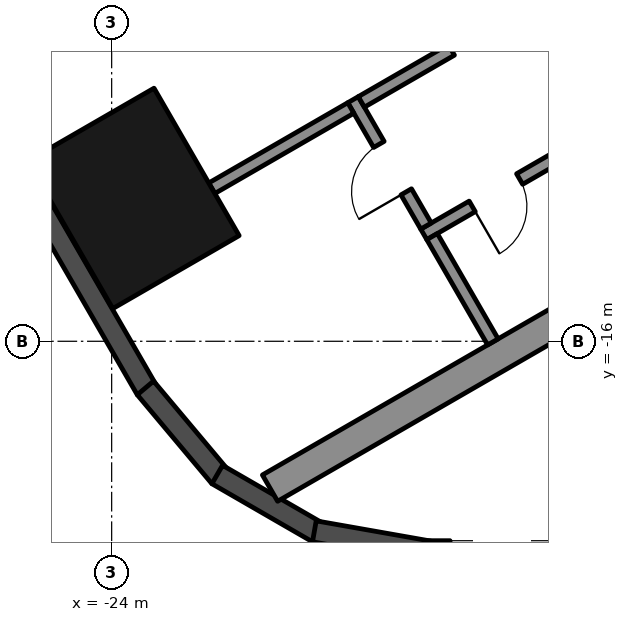
"""IFC4 building model, lengths in metres.
Left out: names, types, materials, properties, quantities, classifications, styles, units other than length and angle.
Written with IfcOpenShell. Run it as: python <this file> out.ifc"""

import sys

from ifc_helpers import new_model, si_unit, direction, frame, frame_2d, origin, origin_2d, place, context, subcontext, project, spatial, rectangle, hollow_rectangle, extrude, element, fill, save


model = new_model("IFC4")
c1 = context("Model", 3, precision=1e-05, world=origin(), true_north=direction((0.0, 1.0)))
c2 = subcontext(c1, "Body", "Model", "MODEL_VIEW")
j1 = project(units=[si_unit("LENGTHUNIT", "METRE"), si_unit("PLANEANGLEUNIT", "RADIAN")], contexts=[c1])
p1 = place(None, origin())
s1 = spatial("IfcSite", under=j1, at=p1, CompositionType="ELEMENT")
p2 = place(p1, origin())
s2 = spatial("IfcBuilding", under=s1, at=p2, CompositionType="ELEMENT")
p3 = place(p2, frame((0.0, 0.0, 68.7)))
s3 = spatial("IfcBuildingStorey", under=s2, at=p3, CompositionType="ELEMENT", Elevation=68.7)
p4 = place(p3, frame((-23.643, -13.65, 0.0), z_axis=(0.0, 0.0, 1.0), x_axis=(-0.5, 0.866025403784, 0.0)))
e1 = element("IfcColumn", 1, at=p4, inside=s3, PredefinedType="COLUMN", context=c2, shape_type="SweptSolid", body=[
    extrude(hollow_rectangle(XDim=2.8, YDim=2.4, WallThickness=0.07, at=origin_2d()), origin(), (0.0, 0.0, 1.0), 3.7),
])
p5 = place(p3, frame((-26.257, -11.893, 0.0), z_axis=(0.0, 0.0, 1.0), x_axis=(0.500018773155, -0.866014564827, 0.0)))
e2 = element("IfcWall", 2, at=p5, inside=s3, PredefinedType="SOLIDWALL", context=c2, shape_type="SweptSolid", body=[
    extrude(rectangle(XDim=5.658, YDim=0.35, at=frame_2d((2.829, 0.0))), origin(), (0.0, 0.0, 1.0), 3.55),
])
for number, where, z_axis, x_axis in (
    (3, (-23.445, -16.768, 0.0), (0.0, 0.0, 1.0), (0.643, -0.766, 0.0)),
    (4, (-22.264, -18.192, 0.0), (0.0, 0.0, 1.0), (0.866, -0.5, 0.0)),
):
    element("IfcWall", number, at=place(p3, frame(where, z_axis=z_axis, x_axis=x_axis)), inside=s3, PredefinedType="SOLIDWALL", context=c2, shape_type="SweptSolid", body=[
        extrude(rectangle(XDim=1.91, YDim=0.35, at=frame_2d((0.955, 0.0))), origin(), (0.0, 0.0, 1.0), 3.55),
    ])
p6 = place(p3, frame((-20.667, -19.126, 0.0), z_axis=(0.0, 0.0, 1.0), x_axis=(0.984798995425, -0.173697837091, 0.0)))
e5 = element("IfcWall", 5, at=p6, inside=s3, PredefinedType="SOLIDWALL", context=c2, shape_type="SweptSolid", body=[
    extrude(rectangle(XDim=1.91, YDim=0.35, at=frame_2d((0.955, 0.0))), origin(), (0.0, 0.0, 1.0), 3.55),
])
p7 = place(p3, frame((-18.816, -19.455, 0.0), z_axis=(0.0, 0.0, 1.0), x_axis=(1.0, 0.0, 0.0)))
e6 = element("IfcWall", 6, at=p7, inside=s3, PredefinedType="SOLIDWALL", context=c2, shape_type="SweptSolid", body=[
    extrude(rectangle(XDim=11.816, YDim=0.35, at=frame_2d((5.908, 0.0))), origin(), (0.0, 0.0, 1.0), 3.55),
])
p8 = place(p7, frame((0.381, 0.0, 0.3)))
e7 = element("IfcOpeningElement", 7, at=p8, cuts=e6, PredefinedType="OPENING", context=c2, shape_type="SweptSolid", body=[
    extrude(rectangle(XDim=1.7, YDim=2.65, at=frame_2d((0.85, 1.325))), frame((0.0, 0.185, 0.0), z_axis=(0.0, -1.0, 0.0), x_axis=(1.0, 0.0, 0.0)), (0.0, 0.0, 1.0), 0.37),
])
p9 = place(p7, frame((7.665, 0.0, 0.0)))
e8 = element("IfcOpeningElement", 8, at=p9, cuts=e6, PredefinedType="OPENING", context=c2, shape_type="SweptSolid", body=[
    extrude(rectangle(XDim=2.4, YDim=2.4, at=frame_2d((1.2, 1.2))), frame((0.0, 0.185, 0.0), z_axis=(0.0, -1.0, 0.0), x_axis=(1.0, 0.0, 0.0)), (0.0, 0.0, 1.0), 0.37),
])
p10 = place(p7, frame((3.866, 0.0, 0.3)))
e9 = element("IfcOpeningElement", 9, at=p10, cuts=e6, PredefinedType="OPENING", context=c2, shape_type="SweptSolid", body=[
    extrude(rectangle(XDim=1.5, YDim=2.65, at=frame_2d((0.75, 1.325))), frame((0.0, 0.185, 0.0), z_axis=(0.0, -1.0, 0.0), x_axis=(1.0, 0.0, 0.0)), (0.0, 0.0, 1.0), 0.37),
])
p11 = place(p7, frame((5.666, 0.0, 0.3)))
e10 = element("IfcOpeningElement", 10, at=p11, cuts=e6, PredefinedType="OPENING", context=c2, shape_type="SweptSolid", body=[
    extrude(rectangle(XDim=1.5, YDim=2.65, at=frame_2d((0.75, 1.325))), frame((0.0, 0.185, 0.0), z_axis=(0.0, -1.0, 0.0), x_axis=(1.0, 0.0, 0.0)), (0.0, 0.0, 1.0), 0.37),
])
p12 = place(p3, frame((-8.547, -10.997, 0.0), z_axis=(0.0, 0.0, 1.0), x_axis=(-0.866025009528, -0.500000682871, 0.0)))
e11 = element("IfcWall", 11, at=p12, inside=s3, PredefinedType="SHEAR", context=c2, shape_type="SweptSolid", body=[
    extrude(rectangle(XDim=14.837, YDim=0.5, at=frame_2d((7.418, 0.0))), origin(), (0.0, 0.0, 1.0), 3.5),
])
p13 = place(p3, frame((-10.068, -9.162, 0.0), z_axis=(0.0, 0.0, 1.0), x_axis=(-0.866032725843, -0.499987317609, 0.0)))
e12 = element("IfcWall", 12, at=p13, inside=s3, PredefinedType="SHEAR", context=c2, shape_type="SweptSolid", body=[
    extrude(rectangle(XDim=10.16, YDim=0.2, at=frame_2d((5.08, 0.0))), origin(), (0.0, 0.0, 1.0), 3.5),
])
p14 = place(p13, frame((3.26, 0.0, 0.0)))
e13 = element("IfcOpeningElement", 13, at=p14, cuts=e12, PredefinedType="OPENING", context=c2, shape_type="SweptSolid", body=[
    extrude(rectangle(XDim=0.9, YDim=2.1, at=frame_2d((0.45, 1.05))), frame((0.0, 0.11, 0.0), z_axis=(0.0, -1.0, 0.0), x_axis=(1.0, 0.0, 0.0)), (0.0, 0.0, 1.0), 0.22),
])
p15 = place(p13, frame((8.34, 0.0, 0.0)))
e14 = element("IfcOpeningElement", 14, at=p15, cuts=e12, PredefinedType="OPENING", context=c2, shape_type="SweptSolid", body=[
    extrude(rectangle(XDim=0.9, YDim=2.1, at=frame_2d((0.45, 1.05))), frame((0.0, 0.11, 0.0), z_axis=(0.0, -1.0, 0.0), x_axis=(1.0, 0.0, 0.0)), (0.0, 0.0, 1.0), 0.22),
])
p16 = place(p3, frame((-20.031, -12.026, 0.0), z_axis=(0.0, 0.0, 1.0), x_axis=(0.500033551112, -0.866006032174, 0.0)))
e15 = element("IfcWall", 15, at=p16, inside=s3, PredefinedType="SHEAR", context=c2, shape_type="SweptSolid", body=[
    extrude(rectangle(XDim=2.4, YDim=0.2, at=frame_2d((1.2, 0.0))), origin(), (0.0, 0.0, 1.0), 3.5),
])
p17 = place(p16, frame((0.85, 0.0, 0.0)))
e16 = element("IfcOpeningElement", 16, at=p17, cuts=e15, PredefinedType="OPENING", context=c2, shape_type="SweptSolid", body=[
    extrude(rectangle(XDim=0.9, YDim=2.1, at=frame_2d((0.45, 1.05))), frame((0.0, 0.11, 0.0), z_axis=(0.0, -1.0, 0.0), x_axis=(1.0, 0.0, 0.0)), (0.0, 0.0, 1.0), 0.22),
])
p18 = place(p3, frame((-18.413, -11.208, 0.0), z_axis=(0.0, 0.0, 1.0), x_axis=(-0.866038183914, -0.499977863513, 0.0)))
e17 = element("IfcWall", 17, at=p18, inside=s3, PredefinedType="SHEAR", context=c2, shape_type="SweptSolid", body=[
    extrude(rectangle(XDim=1.71, YDim=0.2, at=frame_2d((0.855, 0.0))), origin(), (0.0, 0.0, 1.0), 3.5),
])
p19 = place(p3, frame((-18.73, -14.278, 0.0), z_axis=(0.0, 0.0, 1.0), x_axis=(0.50002537861, -0.866010750942, 0.0)))
e18 = element("IfcWall", 18, at=p19, inside=s3, PredefinedType="SHEAR", context=c2, shape_type="SweptSolid", body=[
    extrude(rectangle(XDim=2.0, YDim=0.2, at=frame_2d((1.0, 0.0))), origin(), (0.0, 0.0, 1.0), 3.5),
])
p20 = place(p3, frame((-20.067, -12.163, 0.0), z_axis=(0.0, 0.0, 1.0), x_axis=(-0.866060851709, -0.499938597367, 0.0)))
e19 = element("IfcWall", 19, at=p20, inside=s3, PredefinedType="SHEAR", context=c2, shape_type="SweptSolid", body=[
    extrude(rectangle(XDim=2.64, YDim=0.2, at=frame_2d((1.32, 0.0))), origin(), (0.0, 0.0, 1.0), 3.5),
])
p21 = place(p15, origin())
e20 = element("IfcDoor", 20, at=p21, inside=s3, OperationType="SINGLE_SWING_RIGHT", PredefinedType="DOOR", context=c2, shape_type="SweptSolid", body=[
    extrude(rectangle(XDim=0.9, YDim=2.1, at=frame_2d((0.45, 1.05))), frame((0.0, 0.025, 0.0), z_axis=(0.0, -1.0, 0.0), x_axis=(1.0, 0.0, 0.0)), (0.0, 0.0, 1.0), 0.05),
])
fill(e14, e20)
p22 = place(p17, frame((0.9, 0.0, 0.0), z_axis=(0.0, 0.0, 1.0), x_axis=(-1.0, 0.0, 0.0)))
e21 = element("IfcDoor", 21, at=p22, inside=s3, OperationType="SINGLE_SWING_LEFT", PredefinedType="DOOR", context=c2, shape_type="SweptSolid", body=[
    extrude(rectangle(XDim=0.9, YDim=2.1, at=frame_2d((0.45, 1.05))), frame((0.0, 0.025, 0.0), z_axis=(0.0, -1.0, 0.0), x_axis=(1.0, 0.0, 0.0)), (0.0, 0.0, 1.0), 0.05),
])
fill(e16, e21)
save(model, sys.argv[1])
